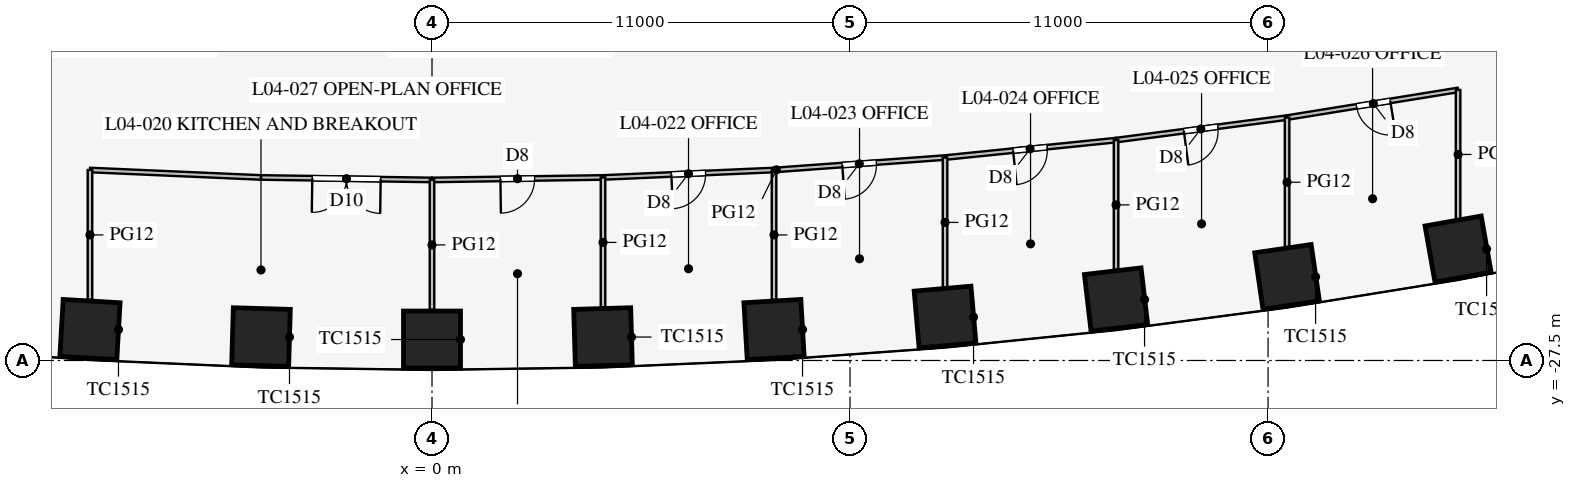
"""IFC4 building model, lengths in metres.
Left out: names, types, materials, properties, quantities, classifications, styles, units other than length and angle.
Written with IfcOpenShell. Run it as: python <this file> out.ifc"""

import sys

from ifc_helpers import new_model, si_unit, direction, frame, frame_2d, origin, origin_2d, place, context, subcontext, project, spatial, rectangle, extrude, element, fill, save


model = new_model("IFC4")
c1 = context("Model", 3, precision=1e-05, world=origin(), true_north=direction((0.0, 1.0)))
c2 = subcontext(c1, "Body", "Model", "MODEL_VIEW")
j1 = project(units=[si_unit("LENGTHUNIT", "METRE"), si_unit("PLANEANGLEUNIT", "RADIAN")], contexts=[c1])
p1 = place(None, origin())
s1 = spatial("IfcSite", under=j1, at=p1, CompositionType="ELEMENT")
p2 = place(p1, origin())
s2 = spatial("IfcBuilding", under=s1, at=p2, CompositionType="ELEMENT")
p3 = place(p2, frame((0.0, 0.0, 20.7)))
s3 = spatial("IfcBuildingStorey", under=s2, at=p3, CompositionType="ELEMENT", Elevation=20.7)
for number, where, z_axis, x_axis in (
    (1, (-9.0, -26.686, 0.0), (0.0, 0.0, 1.0), (0.998, -0.058, 0.0)),
    (2, (-4.5, -26.883, 0.0), (0.0, 0.0, 1.0), (1.0, -0.029, 0.0)),
    (3, (0.0, -26.949, 0.0), (0.0, 0.0, 1.0), (1.0, 0.0, 0.0)),
    (4, (4.5, -26.883, 0.0), (0.0, 0.0, 1.0), (1.0, 0.029, 0.0)),
    (5, (9.0, -26.686, 0.0), (0.0, 0.0, 1.0), (0.998, 0.058, 0.0)),
    (6, (13.5, -26.357, 0.0), (0.0, 0.0, 1.0), (0.996, 0.087, 0.0)),
    (7, (18.0, -25.895, 0.0), (0.0, 0.0, 1.0), (0.993, 0.116, 0.0)),
    (8, (22.5, -25.299, 0.0), (0.0, 0.0, 1.0), (0.989, 0.145, 0.0)),
    (9, (27.0, -24.568, 0.0), (0.0, 0.0, 1.0), (0.985, 0.174, 0.0)),
):
    element("IfcColumn", number, at=place(p3, frame(where, z_axis=z_axis, x_axis=x_axis)), inside=s3, PredefinedType="COLUMN", context=c2, shape_type="SweptSolid", body=[
        extrude(rectangle(XDim=1.5, YDim=1.5, at=origin_2d()), origin(), (0.0, 0.0, 1.0), 4.2),
    ])
p4 = place(p3, frame((0.0, -22.749, 0.0), z_axis=(0.0, 0.0, 1.0), x_axis=(0.999894311967, 0.014538393859, 0.0)))
e10 = element("IfcWall", 10, at=p4, inside=s3, PredefinedType="PARTITIONING", context=c2, shape_type="SweptSolid", body=[
    extrude(rectangle(XDim=4.5, YDim=0.12, at=frame_2d((2.25, 0.0))), origin(), (0.0, 0.0, 1.0), 2.9),
])
p5 = place(p4, frame((1.8, 0.0, 0.15)))
e11 = element("IfcOpeningElement", 11, at=p5, cuts=e10, PredefinedType="OPENING", context=c2, shape_type="SweptSolid", body=[
    extrude(rectangle(XDim=0.9, YDim=2.1, at=frame_2d((0.45, 1.05))), frame((0.0, 0.07, 0.0), z_axis=(0.0, -1.0, 0.0), x_axis=(1.0, 0.0, 0.0)), (0.0, 0.0, 1.0), 0.14),
])
p6 = place(p3, frame((13.5, -22.16, 0.0), z_axis=(0.0, 0.0, 1.0), x_axis=(0.994833141332, 0.101523499286, 0.0)))
e12 = element("IfcWall", 12, at=p6, inside=s3, PredefinedType="PARTITIONING", context=c2, shape_type="SweptSolid", body=[
    extrude(rectangle(XDim=4.523, YDim=0.12, at=frame_2d((2.262, 0.0))), origin(), (0.0, 0.0, 1.0), 2.9),
])
p7 = place(p6, frame((1.8, 0.0, 0.15)))
e13 = element("IfcOpeningElement", 13, at=p7, cuts=e12, PredefinedType="OPENING", context=c2, shape_type="SweptSolid", body=[
    extrude(rectangle(XDim=0.9, YDim=2.1, at=frame_2d((0.45, 1.05))), frame((0.0, 0.07, 0.0), z_axis=(0.0, -1.0, 0.0), x_axis=(1.0, 0.0, 0.0)), (0.0, 0.0, 1.0), 0.14),
])
p8 = place(p3, frame((18.0, -21.701, 0.0), z_axis=(0.0, 0.0, 1.0), x_axis=(0.991435244698, 0.130599217346, 0.0)))
e14 = element("IfcWall", 14, at=p8, inside=s3, PredefinedType="PARTITIONING", context=c2, shape_type="SweptSolid", body=[
    extrude(rectangle(XDim=4.539, YDim=0.12, at=frame_2d((2.27, 0.0))), origin(), (0.0, 0.0, 1.0), 2.9),
])
p9 = place(p8, frame((1.8, 0.0, 0.15)))
e15 = element("IfcOpeningElement", 15, at=p9, cuts=e14, PredefinedType="OPENING", context=c2, shape_type="SweptSolid", body=[
    extrude(rectangle(XDim=0.9, YDim=2.1, at=frame_2d((0.45, 1.05))), frame((0.0, 0.07, 0.0), z_axis=(0.0, -1.0, 0.0), x_axis=(1.0, 0.0, 0.0)), (0.0, 0.0, 1.0), 0.14),
])
p10 = place(p3, frame((22.5, -21.108, 0.0), z_axis=(0.0, 0.0, 1.0), x_axis=(0.987181300889, 0.159602879593, 0.0)))
e16 = element("IfcWall", 16, at=p10, inside=s3, PredefinedType="PARTITIONING", context=c2, shape_type="SweptSolid", body=[
    extrude(rectangle(XDim=4.558, YDim=0.12, at=frame_2d((2.279, 0.0))), origin(), (0.0, 0.0, 1.0), 2.9),
])
p11 = place(p10, frame((1.85, 0.0, 0.15)))
e17 = element("IfcOpeningElement", 17, at=p11, cuts=e16, PredefinedType="OPENING", context=c2, shape_type="SweptSolid", body=[
    extrude(rectangle(XDim=0.9, YDim=2.1, at=frame_2d((0.45, 1.05))), frame((0.0, 0.07, 0.0), z_axis=(0.0, -1.0, 0.0), x_axis=(1.0, 0.0, 0.0)), (0.0, 0.0, 1.0), 0.14),
])
p12 = place(p3, frame((4.5, -22.683, 0.0), z_axis=(0.0, 0.0, 1.0), x_axis=(0.999052370647, 0.043524254212, 0.0)))
e18 = element("IfcWall", 18, at=p12, inside=s3, PredefinedType="PARTITIONING", context=c2, shape_type="SweptSolid", body=[
    extrude(rectangle(XDim=4.504, YDim=0.12, at=frame_2d((2.252, 0.0))), origin(), (0.0, 0.0, 1.0), 2.9),
])
p13 = place(p12, frame((1.8, 0.0, 0.15)))
e19 = element("IfcOpeningElement", 19, at=p13, cuts=e18, PredefinedType="OPENING", context=c2, shape_type="SweptSolid", body=[
    extrude(rectangle(XDim=0.9, YDim=2.1, at=frame_2d((0.45, 1.05))), frame((0.0, 0.07, 0.0), z_axis=(0.0, -1.0, 0.0), x_axis=(1.0, 0.0, 0.0)), (0.0, 0.0, 1.0), 0.14),
])
p14 = place(p3, frame((9.0, -22.487, 0.0), z_axis=(0.0, 0.0, 1.0), x_axis=(0.997363894896, 0.072562119306, 0.0)))
e20 = element("IfcWall", 20, at=p14, inside=s3, PredefinedType="PARTITIONING", context=c2, shape_type="SweptSolid", body=[
    extrude(rectangle(XDim=4.512, YDim=0.12, at=frame_2d((2.256, 0.0))), origin(), (0.0, 0.0, 1.0), 2.9),
])
p15 = place(p14, frame((1.8, 0.0, 0.15)))
e21 = element("IfcOpeningElement", 21, at=p15, cuts=e20, PredefinedType="OPENING", context=c2, shape_type="SweptSolid", body=[
    extrude(rectangle(XDim=0.9, YDim=2.1, at=frame_2d((0.45, 1.05))), frame((0.0, 0.07, 0.0), z_axis=(0.0, -1.0, 0.0), x_axis=(1.0, 0.0, 0.0)), (0.0, 0.0, 1.0), 0.14),
])
p16 = place(p3, frame((-4.5, -22.683, 0.0), z_axis=(0.0, 0.0, 1.0), x_axis=(0.999894311967, -0.014538393859, 0.0)))
e22 = element("IfcWall", 22, at=p16, inside=s3, PredefinedType="PARTITIONING", context=c2, shape_type="SweptSolid", body=[
    extrude(rectangle(XDim=4.5, YDim=0.12, at=frame_2d((2.25, 0.0))), origin(), (0.0, 0.0, 1.0), 2.9),
])
p17 = place(p16, frame((1.35, 0.0, 0.15)))
e23 = element("IfcOpeningElement", 23, at=p17, cuts=e22, PredefinedType="OPENING", context=c2, shape_type="SweptSolid", body=[
    extrude(rectangle(XDim=1.8, YDim=2.1, at=frame_2d((0.9, 1.05))), frame((0.0, 0.07, 0.0), z_axis=(0.0, -1.0, 0.0), x_axis=(1.0, 0.0, 0.0)), (0.0, 0.0, 1.0), 0.14),
])
p18 = place(p3, frame((-9.0, -22.487, 0.0), z_axis=(0.0, 0.0, 1.0), x_axis=(0.999052370647, -0.043524254212, 0.0)))
e24 = element("IfcWall", 24, at=p18, inside=s3, PredefinedType="PARTITIONING", context=c2, shape_type="SweptSolid", body=[
    extrude(rectangle(XDim=4.504, YDim=0.12, at=frame_2d((2.252, 0.0))), origin(), (0.0, 0.0, 1.0), 2.9),
])
p19 = place(p3, frame((0.0, -22.749, 0.0), z_axis=(0.0, 0.0, 1.0), x_axis=(0.0, -1.0, 0.0)))
e25 = element("IfcWall", 25, at=p19, inside=s3, PredefinedType="PARTITIONING", context=c2, shape_type="SweptSolid", body=[
    extrude(rectangle(XDim=3.42, YDim=0.12, at=frame_2d((1.71, 0.0))), origin(), (0.0, 0.0, 1.0), 2.9),
])
p20 = place(p3, frame((13.5, -22.16, 0.0), z_axis=(0.0, 0.0, 1.0), x_axis=(0.0, -1.0, 0.0)))
e26 = element("IfcWall", 26, at=p20, inside=s3, PredefinedType="PARTITIONING", context=c2, shape_type="SweptSolid", body=[
    extrude(rectangle(XDim=3.414, YDim=0.12, at=frame_2d((1.707, 0.0))), origin(), (0.0, 0.0, 1.0), 2.9),
])
p21 = place(p3, frame((18.0, -21.701, 0.0), z_axis=(0.0, 0.0, 1.0), x_axis=(0.0, -1.0, 0.0)))
e27 = element("IfcWall", 27, at=p21, inside=s3, PredefinedType="PARTITIONING", context=c2, shape_type="SweptSolid", body=[
    extrude(rectangle(XDim=3.409, YDim=0.12, at=frame_2d((1.705, 0.0))), origin(), (0.0, 0.0, 1.0), 2.9),
])
p22 = place(p3, frame((22.5, -21.108, 0.0), z_axis=(0.0, 0.0, 1.0), x_axis=(0.0, -1.0, 0.0)))
e28 = element("IfcWall", 28, at=p22, inside=s3, PredefinedType="PARTITIONING", context=c2, shape_type="SweptSolid", body=[
    extrude(rectangle(XDim=3.403, YDim=0.12, at=frame_2d((1.702, 0.0))), origin(), (0.0, 0.0, 1.0), 2.9),
])
p23 = place(p3, frame((27.0, -20.38, 0.0), z_axis=(0.0, 0.0, 1.0), x_axis=(0.0, -1.0, 0.0)))
e29 = element("IfcWall", 29, at=p23, inside=s3, PredefinedType="PARTITIONING", context=c2, shape_type="SweptSolid", body=[
    extrude(rectangle(XDim=3.396, YDim=0.12, at=frame_2d((1.698, 0.0))), origin(), (0.0, 0.0, 1.0), 2.9),
])
p24 = place(p3, frame((4.5, -22.683, 0.0), z_axis=(0.0, 0.0, 1.0), x_axis=(0.0, -1.0, 0.0)))
e30 = element("IfcWall", 30, at=p24, inside=s3, PredefinedType="PARTITIONING", context=c2, shape_type="SweptSolid", body=[
    extrude(rectangle(XDim=3.419, YDim=0.12, at=frame_2d((1.71, 0.0))), origin(), (0.0, 0.0, 1.0), 2.9),
])
for number, where, z_axis, x_axis in (
    (31, (9.0, -22.487, 0.0), (0.0, 0.0, 1.0), (0.0, -1.0, 0.0)),
    (32, (-9.0, -22.487, 0.0), (0.0, 0.0, 1.0), (0.0, -1.0, 0.0)),
):
    element("IfcWall", number, at=place(p3, frame(where, z_axis=z_axis, x_axis=x_axis)), inside=s3, PredefinedType="PARTITIONING", context=c2, shape_type="SweptSolid", body=[
        extrude(rectangle(XDim=3.417, YDim=0.12, at=frame_2d((1.709, 0.0))), origin(), (0.0, 0.0, 1.0), 2.9),
    ])
p25 = place(p17, frame((1.8, 0.0, 0.0), z_axis=(0.0, 0.0, 1.0), x_axis=(-1.0, 0.0, 0.0)))
e33 = element("IfcDoor", 33, at=p25, inside=s3, OperationType="DOUBLE_DOOR_SINGLE_SWING", PredefinedType="DOOR", context=c2, shape_type="SweptSolid", body=[
    extrude(rectangle(XDim=1.8, YDim=2.1, at=frame_2d((0.9, 1.05))), frame((0.0, 0.025, 0.0), z_axis=(0.0, -1.0, 0.0), x_axis=(1.0, 0.0, 0.0)), (0.0, 0.0, 1.0), 0.05),
])
fill(e23, e33)
p26 = place(p5, frame((0.9, 0.0, 0.0), z_axis=(0.0, 0.0, 1.0), x_axis=(-1.0, 0.0, 0.0)))
e34 = element("IfcDoor", 34, at=p26, inside=s3, OperationType="SINGLE_SWING_RIGHT", PredefinedType="DOOR", context=c2, shape_type="SweptSolid", body=[
    extrude(rectangle(XDim=0.9, YDim=2.1, at=frame_2d((0.45, 1.05))), frame((0.0, 0.025, 0.0), z_axis=(0.0, -1.0, 0.0), x_axis=(1.0, 0.0, 0.0)), (0.0, 0.0, 1.0), 0.05),
])
fill(e11, e34)
p27 = place(p13, frame((0.9, 0.0, 0.0), z_axis=(0.0, 0.0, 1.0), x_axis=(-1.0, 0.0, 0.0)))
e35 = element("IfcDoor", 35, at=p27, inside=s3, OperationType="SINGLE_SWING_RIGHT", PredefinedType="DOOR", context=c2, shape_type="SweptSolid", body=[
    extrude(rectangle(XDim=0.9, YDim=2.1, at=frame_2d((0.45, 1.05))), frame((0.0, 0.025, 0.0), z_axis=(0.0, -1.0, 0.0), x_axis=(1.0, 0.0, 0.0)), (0.0, 0.0, 1.0), 0.05),
])
fill(e19, e35)
p28 = place(p15, frame((0.9, 0.0, 0.0), z_axis=(0.0, 0.0, 1.0), x_axis=(-1.0, 0.0, 0.0)))
e36 = element("IfcDoor", 36, at=p28, inside=s3, OperationType="SINGLE_SWING_RIGHT", PredefinedType="DOOR", context=c2, shape_type="SweptSolid", body=[
    extrude(rectangle(XDim=0.9, YDim=2.1, at=frame_2d((0.45, 1.05))), frame((0.0, 0.025, 0.0), z_axis=(0.0, -1.0, 0.0), x_axis=(1.0, 0.0, 0.0)), (0.0, 0.0, 1.0), 0.05),
])
fill(e21, e36)
p29 = place(p7, frame((0.9, 0.0, 0.0), z_axis=(0.0, 0.0, 1.0), x_axis=(-1.0, 0.0, 0.0)))
e37 = element("IfcDoor", 37, at=p29, inside=s3, OperationType="SINGLE_SWING_RIGHT", PredefinedType="DOOR", context=c2, shape_type="SweptSolid", body=[
    extrude(rectangle(XDim=0.9, YDim=2.1, at=frame_2d((0.45, 1.05))), frame((0.0, 0.025, 0.0), z_axis=(0.0, -1.0, 0.0), x_axis=(1.0, 0.0, 0.0)), (0.0, 0.0, 1.0), 0.05),
])
fill(e13, e37)
p30 = place(p9, frame((0.9, 0.0, 0.0), z_axis=(0.0, 0.0, 1.0), x_axis=(-1.0, 0.0, 0.0)))
e38 = element("IfcDoor", 38, at=p30, inside=s3, OperationType="SINGLE_SWING_RIGHT", PredefinedType="DOOR", context=c2, shape_type="SweptSolid", body=[
    extrude(rectangle(XDim=0.9, YDim=2.1, at=frame_2d((0.45, 1.05))), frame((0.0, 0.025, 0.0), z_axis=(0.0, -1.0, 0.0), x_axis=(1.0, 0.0, 0.0)), (0.0, 0.0, 1.0), 0.05),
])
fill(e15, e38)
p31 = place(p11, frame((0.9, 0.0, 0.0), z_axis=(0.0, 0.0, 1.0), x_axis=(-1.0, 0.0, 0.0)))
e39 = element("IfcDoor", 39, at=p31, inside=s3, OperationType="SINGLE_SWING_LEFT", PredefinedType="DOOR", context=c2, shape_type="SweptSolid", body=[
    extrude(rectangle(XDim=0.9, YDim=2.1, at=frame_2d((0.45, 1.05))), frame((0.0, 0.025, 0.0), z_axis=(0.0, -1.0, 0.0), x_axis=(1.0, 0.0, 0.0)), (0.0, 0.0, 1.0), 0.05),
])
fill(e17, e39)
save(model, sys.argv[1])
